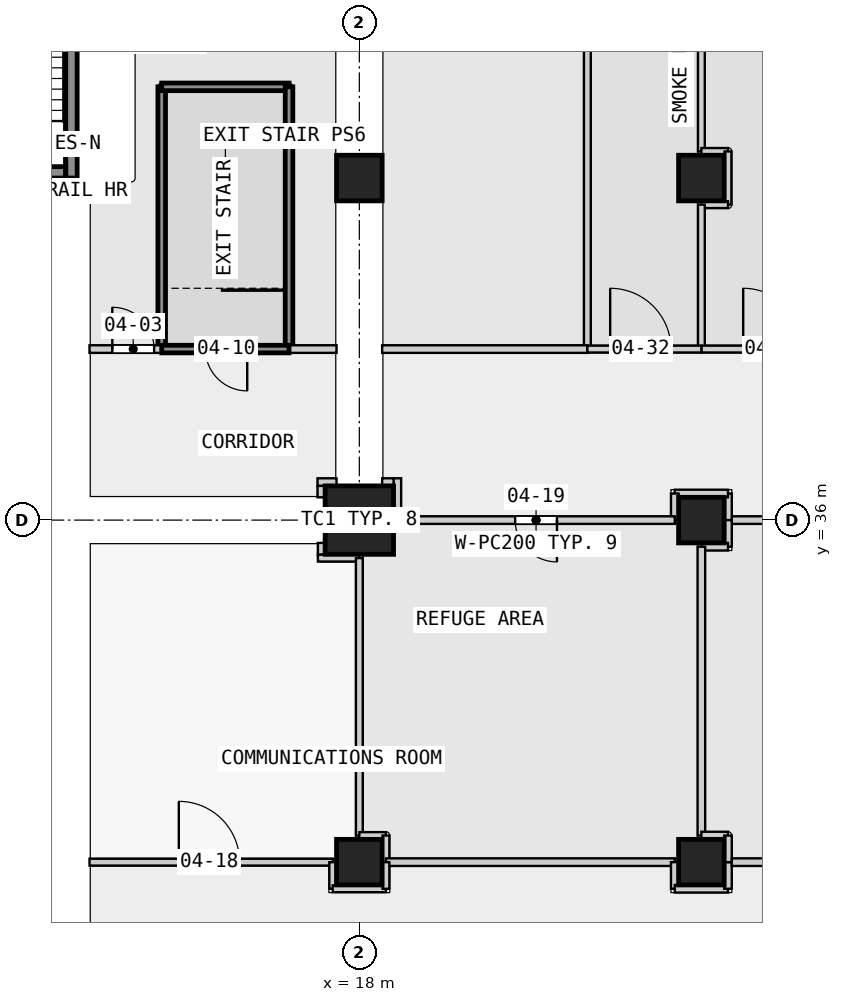
"""IFC4 building model, lengths in metres.
Left out: names, types, materials, properties, quantities, classifications, styles, units other than length and angle.
Written with IfcOpenShell. Run it as: python <this file> out.ifc"""

import sys

from ifc_helpers import new_model, si_unit, direction, frame, frame_2d, origin, origin_2d, place, context, subcontext, project, spatial, rectangle, extrude, element, fill, save


model = new_model("IFC4")
c1 = context("Model", 3, precision=1e-05, world=origin(), true_north=direction((0.0, 1.0)))
c2 = subcontext(c1, "Body", "Model", "MODEL_VIEW")
j1 = project(units=[si_unit("LENGTHUNIT", "METRE"), si_unit("PLANEANGLEUNIT", "RADIAN")], contexts=[c1])
p1 = place(None, origin())
s1 = spatial("IfcSite", under=j1, at=p1, CompositionType="ELEMENT")
p2 = place(p1, origin())
s2 = spatial("IfcBuilding", under=s1, at=p2, CompositionType="ELEMENT")
p3 = place(p2, frame((0.0, 0.0, 21.8)))
s3 = spatial("IfcBuildingStorey", under=s2, at=p3, CompositionType="ELEMENT", Elevation=21.8)
p4 = place(p3, frame((18.0, 27.0, 0.0), z_axis=(0.0, 0.0, 1.0), x_axis=(1.0, 0.0, 0.0)))
e1 = element("IfcColumn", 1, at=p4, inside=s3, PredefinedType="COLUMN", context=c2, shape_type="SweptSolid", body=[
    extrude(rectangle(XDim=1.2, YDim=1.2, at=origin_2d()), origin(), (0.0, 0.0, 1.0), 5.0),
])
p5 = place(p3, frame((18.0, 36.0, 0.0), z_axis=(0.0, 0.0, 1.0), x_axis=(1.0, 0.0, 0.0)))
e2 = element("IfcColumn", 2, at=p5, inside=s3, PredefinedType="COLUMN", context=c2, shape_type="SweptSolid", body=[
    extrude(rectangle(XDim=1.8, YDim=1.8, at=origin_2d()), origin(), (0.0, 0.0, 1.0), 5.0),
])
for number, where, z_axis, x_axis in (
    (3, (18.0, 45.0, 0.0), (0.0, 0.0, 1.0), (1.0, 0.0, 0.0)),
    (4, (27.0, 27.0, 0.0), (0.0, 0.0, 1.0), (1.0, 0.0, 0.0)),
    (5, (27.0, 36.0, 0.0), (0.0, 0.0, 1.0), (1.0, 0.0, 0.0)),
    (6, (27.0, 45.0, 0.0), (0.0, 0.0, 1.0), (1.0, 0.0, 0.0)),
):
    element("IfcColumn", number, at=place(p3, frame(where, z_axis=z_axis, x_axis=x_axis)), inside=s3, PredefinedType="COLUMN", context=c2, shape_type="SweptSolid", body=[
        extrude(rectangle(XDim=1.2, YDim=1.2, at=origin_2d()), origin(), (0.0, 0.0, 1.0), 5.0),
    ])
p6 = place(p3, frame((7.725, 45.15, 0.0), z_axis=(0.0, 0.0, 1.0), x_axis=(1.0, 0.0, 0.0)))
e7 = element("IfcWall", 7, at=p6, inside=s3, PredefinedType="SHEAR", context=c2, shape_type="SweptSolid", body=[
    extrude(rectangle(XDim=2.55, YDim=0.3, at=frame_2d((1.275, 0.0))), origin(), (0.0, 0.0, 1.0), 5.0),
])
p7 = place(p3, frame((10.425, 45.0, 0.0), z_axis=(0.0, 0.0, 1.0), x_axis=(0.0, 1.0, 0.0)))
e8 = element("IfcWall", 8, at=p7, inside=s3, PredefinedType="SHEAR", context=c2, shape_type="SweptSolid", body=[
    extrude(rectangle(XDim=7.2, YDim=0.3, at=frame_2d((3.6, 0.0))), origin(), (0.0, 0.0, 1.0), 5.0),
])
p8 = place(p3, frame((35.3, 36.0, 0.0), z_axis=(0.0, 0.0, 1.0), x_axis=(-1.0, 0.0, 0.0)))
e9 = element("IfcWall", 9, at=p8, inside=s3, PredefinedType="PARTITIONING", context=c2, shape_type="SweptSolid", body=[
    extrude(rectangle(XDim=7.6, YDim=0.2, at=frame_2d((3.8, 0.0))), origin(), (0.0, 0.0, 1.0), 4.5),
])
p9 = place(p3, frame((27.0, 53.3, 0.0), z_axis=(0.0, 0.0, 1.0), x_axis=(0.0, -1.0, 0.0)))
e10 = element("IfcWall", 10, at=p9, inside=s3, PredefinedType="PARTITIONING", context=c2, shape_type="SweptSolid", body=[
    extrude(rectangle(XDim=7.6, YDim=0.18, at=frame_2d((3.8, 0.0))), origin(), (0.0, 0.0, 1.0), 4.5),
])
p10 = place(p3, frame((27.0, 45.7, 0.0), z_axis=(0.0, 0.0, 1.0), x_axis=(1.0, 0.0, 0.0)))
e11 = element("IfcWall", 11, at=p10, inside=s3, PredefinedType="PARTITIONING", context=c2, shape_type="SweptSolid", body=[
    extrude(rectangle(XDim=0.7, YDim=0.18, at=frame_2d((0.35, 0.0))), origin(), (0.0, 0.0, 1.0), 4.5),
])
p11 = place(p3, frame((27.7, 45.7, 0.0), z_axis=(0.0, 0.0, 1.0), x_axis=(0.0, -1.0, 0.0)))
e12 = element("IfcWall", 12, at=p11, inside=s3, PredefinedType="PARTITIONING", context=c2, shape_type="SweptSolid", body=[
    extrude(rectangle(XDim=1.4, YDim=0.18, at=frame_2d((0.7, 0.0))), origin(), (0.0, 0.0, 1.0), 4.5),
])
p12 = place(p3, frame((27.7, 44.3, 0.0), z_axis=(0.0, 0.0, 1.0), x_axis=(-1.0, 0.0, 0.0)))
e13 = element("IfcWall", 13, at=p12, inside=s3, PredefinedType="PARTITIONING", context=c2, shape_type="SweptSolid", body=[
    extrude(rectangle(XDim=0.7, YDim=0.18, at=frame_2d((0.35, 0.0))), origin(), (0.0, 0.0, 1.0), 4.5),
])
p13 = place(p3, frame((27.0, 44.3, 0.0), z_axis=(0.0, 0.0, 1.0), x_axis=(0.0, -1.0, 0.0)))
e14 = element("IfcWall", 14, at=p13, inside=s3, PredefinedType="PARTITIONING", context=c2, shape_type="SweptSolid", body=[
    extrude(rectangle(XDim=3.8, YDim=0.18, at=frame_2d((1.9, 0.0))), origin(), (0.0, 0.0, 1.0), 4.5),
])
p14 = place(p3, frame((24.0, 59.85, 0.0), z_axis=(0.0, 0.0, 1.0), x_axis=(0.0, -1.0, 0.0)))
e15 = element("IfcWall", 15, at=p14, inside=s3, PredefinedType="PARTITIONING", context=c2, shape_type="SweptSolid", body=[
    extrude(rectangle(XDim=19.35, YDim=0.18, at=frame_2d((9.675, 0.0))), origin(), (0.0, 0.0, 1.0), 4.5),
])
p15 = place(p3, frame((12.8, 40.5, 0.0), z_axis=(0.0, 0.0, 1.0), x_axis=(0.0, 1.0, 0.0)))
e16 = element("IfcWall", 16, at=p15, inside=s3, PredefinedType="PARTITIONING", context=c2, shape_type="SweptSolid", body=[
    extrude(rectangle(XDim=6.9, YDim=0.2, at=frame_2d((3.45, 0.0))), origin(), (0.0, 0.0, 1.0), 4.5),
])
p16 = place(p3, frame((12.8, 47.4, 0.0), z_axis=(0.0, 0.0, 1.0), x_axis=(1.0, 0.0, 0.0)))
e17 = element("IfcWall", 17, at=p16, inside=s3, PredefinedType="PARTITIONING", context=c2, shape_type="SweptSolid", body=[
    extrude(rectangle(XDim=3.35, YDim=0.2, at=frame_2d((1.675, 0.0))), origin(), (0.0, 0.0, 1.0), 4.5),
])
p17 = place(p3, frame((16.15, 47.4, 0.0), z_axis=(0.0, 0.0, 1.0), x_axis=(0.0, -1.0, 0.0)))
e18 = element("IfcWall", 18, at=p17, inside=s3, PredefinedType="PARTITIONING", context=c2, shape_type="SweptSolid", body=[
    extrude(rectangle(XDim=6.9, YDim=0.2, at=frame_2d((3.45, 0.0))), origin(), (0.0, 0.0, 1.0), 4.5),
])
p18 = place(p3, frame((27.7, 36.0, 0.0), z_axis=(0.0, 0.0, 1.0), x_axis=(0.0, 1.0, 0.0)))
e19 = element("IfcWall", 19, at=p18, inside=s3, PredefinedType="PARTITIONING", context=c2, shape_type="SweptSolid", body=[
    extrude(rectangle(XDim=0.7, YDim=0.2, at=frame_2d((0.35, 0.0))), origin(), (0.0, 0.0, 1.0), 4.5),
])
p19 = place(p3, frame((27.7, 36.7, 0.0), z_axis=(0.0, 0.0, 1.0), x_axis=(-1.0, 0.0, 0.0)))
e20 = element("IfcWall", 20, at=p19, inside=s3, PredefinedType="PARTITIONING", context=c2, shape_type="SweptSolid", body=[
    extrude(rectangle(XDim=1.4, YDim=0.2, at=frame_2d((0.7, 0.0))), origin(), (0.0, 0.0, 1.0), 4.5),
])
p20 = place(p3, frame((26.3, 36.7, 0.0), z_axis=(0.0, 0.0, 1.0), x_axis=(0.0, -1.0, 0.0)))
e21 = element("IfcWall", 21, at=p20, inside=s3, PredefinedType="PARTITIONING", context=c2, shape_type="SweptSolid", body=[
    extrude(rectangle(XDim=0.7, YDim=0.2, at=frame_2d((0.35, 0.0))), origin(), (0.0, 0.0, 1.0), 4.5),
])
p21 = place(p3, frame((26.3, 36.0, 0.0), z_axis=(0.0, 0.0, 1.0), x_axis=(-1.0, 0.0, 0.0)))
e22 = element("IfcWall", 22, at=p21, inside=s3, PredefinedType="PARTITIONING", context=c2, shape_type="SweptSolid", body=[
    extrude(rectangle(XDim=7.3, YDim=0.2, at=frame_2d((3.65, 0.0))), origin(), (0.0, 0.0, 1.0), 4.5),
])
p22 = place(p21, frame((3.1, 0.0, 0.0)))
e23 = element("IfcOpeningElement", 23, at=p22, cuts=e22, PredefinedType="OPENING", context=c2, shape_type="SweptSolid", body=[
    extrude(rectangle(XDim=1.1, YDim=2.1, at=frame_2d((0.55, 1.05))), frame((0.0, 0.11, 0.0), z_axis=(0.0, -1.0, 0.0), x_axis=(1.0, 0.0, 0.0)), (0.0, 0.0, 1.0), 0.22),
])
p23 = place(p3, frame((19.0, 36.0, 0.0), z_axis=(0.0, 0.0, 1.0), x_axis=(0.0, 1.0, 0.0)))
e24 = element("IfcWall", 24, at=p23, inside=s3, PredefinedType="PARTITIONING", context=c2, shape_type="SweptSolid", body=[
    extrude(rectangle(XDim=1.1, YDim=0.2, at=frame_2d((0.55, 0.0))), origin(), (0.0, 0.0, 1.0), 4.5),
])
p24 = place(p3, frame((18.9, 37.0, 0.0), z_axis=(0.0, 0.0, 1.0), x_axis=(-1.0, 0.0, 0.0)))
e25 = element("IfcWall", 25, at=p24, inside=s3, PredefinedType="PARTITIONING", context=c2, shape_type="SweptSolid", body=[
    extrude(rectangle(XDim=0.3, YDim=0.2, at=frame_2d((0.15, 0.0))), origin(), (0.0, 0.0, 1.0), 4.5),
])
p25 = place(p3, frame((17.4, 37.0, 0.0), z_axis=(0.0, 0.0, 1.0), x_axis=(-1.0, 0.0, 0.0)))
e26 = element("IfcWall", 26, at=p25, inside=s3, PredefinedType="PARTITIONING", context=c2, shape_type="SweptSolid", body=[
    extrude(rectangle(XDim=0.5, YDim=0.2, at=frame_2d((0.25, 0.0))), origin(), (0.0, 0.0, 1.0), 4.5),
])
p26 = place(p3, frame((17.0, 36.9, 0.0), z_axis=(0.0, 0.0, 1.0), x_axis=(0.0, -1.0, 0.0)))
e27 = element("IfcWall", 27, at=p26, inside=s3, PredefinedType="PARTITIONING", context=c2, shape_type="SweptSolid", body=[
    extrude(rectangle(XDim=0.3, YDim=0.2, at=frame_2d((0.15, 0.0))), origin(), (0.0, 0.0, 1.0), 4.5),
])
p27 = place(p3, frame((10.9, 40.5, 0.0), z_axis=(0.0, 0.0, 1.0), x_axis=(1.0, 0.0, 0.0)))
e28 = element("IfcWall", 28, at=p27, inside=s3, PredefinedType="PARTITIONING", context=c2, shape_type="SweptSolid", body=[
    extrude(rectangle(XDim=1.9, YDim=0.2, at=frame_2d((0.95, 0.0))), origin(), (0.0, 0.0, 1.0), 4.5),
])
p28 = place(p27, frame((0.6, 0.0, 0.0)))
e29 = element("IfcOpeningElement", 29, at=p28, cuts=e28, PredefinedType="OPENING", context=c2, shape_type="SweptSolid", body=[
    extrude(rectangle(XDim=1.1, YDim=2.1, at=frame_2d((0.55, 1.05))), frame((0.0, 0.11, 0.0), z_axis=(0.0, -1.0, 0.0), x_axis=(1.0, 0.0, 0.0)), (0.0, 0.0, 1.0), 0.22),
])
p29 = place(p3, frame((17.0, 35.4, 0.0), z_axis=(0.0, 0.0, 1.0), x_axis=(0.0, -1.0, 0.0)))
e30 = element("IfcWall", 30, at=p29, inside=s3, PredefinedType="PARTITIONING", context=c2, shape_type="SweptSolid", body=[
    extrude(rectangle(XDim=0.31, YDim=0.18, at=frame_2d((0.155, 0.0))), origin(), (0.0, 0.0, 1.0), 4.5),
])
p30 = place(p3, frame((16.91, 35.0, 0.0), z_axis=(0.0, 0.0, 1.0), x_axis=(1.0, 0.0, 0.0)))
e31 = element("IfcWall", 31, at=p30, inside=s3, PredefinedType="PARTITIONING", context=c2, shape_type="SweptSolid", body=[
    extrude(rectangle(XDim=1.09, YDim=0.18, at=frame_2d((0.545, 0.0))), origin(), (0.0, 0.0, 1.0), 4.5),
])
p31 = place(p3, frame((18.0, 35.0, 0.0), z_axis=(0.0, 0.0, 1.0), x_axis=(0.0, -1.0, 0.0)))
e32 = element("IfcWall", 32, at=p31, inside=s3, PredefinedType="PARTITIONING", context=c2, shape_type="SweptSolid", body=[
    extrude(rectangle(XDim=7.3, YDim=0.18, at=frame_2d((3.65, 0.0))), origin(), (0.0, 0.0, 1.0), 4.5),
])
for number, where, z_axis, x_axis in (
    (33, (18.0, 27.7, 0.0), (0.0, 0.0, 1.0), (1.0, 0.0, 0.0)),
    (34, (18.7, 27.7, 0.0), (0.0, 0.0, 1.0), (0.0, -1.0, 0.0)),
):
    element("IfcWall", number, at=place(p3, frame(where, z_axis=z_axis, x_axis=x_axis)), inside=s3, PredefinedType="PARTITIONING", context=c2, shape_type="SweptSolid", body=[
        extrude(rectangle(XDim=0.7, YDim=0.18, at=frame_2d((0.35, 0.0))), origin(), (0.0, 0.0, 1.0), 4.5),
    ])
p32 = place(p3, frame((18.7, 27.0, 0.0), z_axis=(0.0, 0.0, 1.0), x_axis=(1.0, 0.0, 0.0)))
e35 = element("IfcWall", 35, at=p32, inside=s3, PredefinedType="PARTITIONING", context=c2, shape_type="SweptSolid", body=[
    extrude(rectangle(XDim=7.6, YDim=0.2, at=frame_2d((3.8, 0.0))), origin(), (0.0, 0.0, 1.0), 4.5),
])
p33 = place(p3, frame((26.3, 27.0, 0.0), z_axis=(0.0, 0.0, 1.0), x_axis=(0.0, -1.0, 0.0)))
e36 = element("IfcWall", 36, at=p33, inside=s3, PredefinedType="PARTITIONING", context=c2, shape_type="SweptSolid", body=[
    extrude(rectangle(XDim=0.7, YDim=0.2, at=frame_2d((0.35, 0.0))), origin(), (0.0, 0.0, 1.0), 4.5),
])
p34 = place(p3, frame((26.3, 26.3, 0.0), z_axis=(0.0, 0.0, 1.0), x_axis=(1.0, 0.0, 0.0)))
e37 = element("IfcWall", 37, at=p34, inside=s3, PredefinedType="PARTITIONING", context=c2, shape_type="SweptSolid", body=[
    extrude(rectangle(XDim=1.4, YDim=0.2, at=frame_2d((0.7, 0.0))), origin(), (0.0, 0.0, 1.0), 4.5),
])
p35 = place(p3, frame((27.7, 26.3, 0.0), z_axis=(0.0, 0.0, 1.0), x_axis=(0.0, 1.0, 0.0)))
e38 = element("IfcWall", 38, at=p35, inside=s3, PredefinedType="PARTITIONING", context=c2, shape_type="SweptSolid", body=[
    extrude(rectangle(XDim=0.7, YDim=0.2, at=frame_2d((0.35, 0.0))), origin(), (0.0, 0.0, 1.0), 4.5),
])
p36 = place(p3, frame((10.9, 27.0, 0.0), z_axis=(0.0, 0.0, 1.0), x_axis=(1.0, 0.0, 0.0)))
e39 = element("IfcWall", 39, at=p36, inside=s3, PredefinedType="PARTITIONING", context=c2, shape_type="SweptSolid", body=[
    extrude(rectangle(XDim=6.4, YDim=0.18, at=frame_2d((3.2, 0.0))), origin(), (0.0, 0.0, 1.0), 4.5),
])
p37 = place(p36, frame((2.35, 0.0, 0.0)))
e40 = element("IfcOpeningElement", 40, at=p37, cuts=e39, PredefinedType="OPENING", context=c2, shape_type="SweptSolid", body=[
    extrude(rectangle(XDim=1.6, YDim=2.4, at=frame_2d((0.8, 1.2))), frame((0.0, 0.1, 0.0), z_axis=(0.0, -1.0, 0.0), x_axis=(1.0, 0.0, 0.0)), (0.0, 0.0, 1.0), 0.2),
])
p38 = place(p3, frame((17.3, 27.0, 0.0), z_axis=(0.0, 0.0, 1.0), x_axis=(0.0, -1.0, 0.0)))
e41 = element("IfcWall", 41, at=p38, inside=s3, PredefinedType="PARTITIONING", context=c2, shape_type="SweptSolid", body=[
    extrude(rectangle(XDim=0.7, YDim=0.18, at=frame_2d((0.35, 0.0))), origin(), (0.0, 0.0, 1.0), 4.5),
])
p39 = place(p3, frame((17.3, 26.3, 0.0), z_axis=(0.0, 0.0, 1.0), x_axis=(1.0, 0.0, 0.0)))
e42 = element("IfcWall", 42, at=p39, inside=s3, PredefinedType="PARTITIONING", context=c2, shape_type="SweptSolid", body=[
    extrude(rectangle(XDim=1.4, YDim=0.18, at=frame_2d((0.7, 0.0))), origin(), (0.0, 0.0, 1.0), 4.5),
])
p40 = place(p3, frame((18.7, 26.3, 0.0), z_axis=(0.0, 0.0, 1.0), x_axis=(0.0, 1.0, 0.0)))
e43 = element("IfcWall", 43, at=p40, inside=s3, PredefinedType="PARTITIONING", context=c2, shape_type="SweptSolid", body=[
    extrude(rectangle(XDim=0.7, YDim=0.18, at=frame_2d((0.35, 0.0))), origin(), (0.0, 0.0, 1.0), 4.5),
])
for number, where, z_axis, x_axis in (
    (44, (27.7, 36.0, 0.0), (0.0, 0.0, 1.0), (0.0, -1.0, 0.0)),
    (45, (27.7, 35.3, 0.0), (0.0, 0.0, 1.0), (-1.0, 0.0, 0.0)),
):
    element("IfcWall", number, at=place(p3, frame(where, z_axis=z_axis, x_axis=x_axis)), inside=s3, PredefinedType="PARTITIONING", context=c2, shape_type="SweptSolid", body=[
        extrude(rectangle(XDim=0.7, YDim=0.2, at=frame_2d((0.35, 0.0))), origin(), (0.0, 0.0, 1.0), 4.5),
    ])
p41 = place(p3, frame((27.0, 35.3, 0.0), z_axis=(0.0, 0.0, 1.0), x_axis=(0.0, -1.0, 0.0)))
e46 = element("IfcWall", 46, at=p41, inside=s3, PredefinedType="PARTITIONING", context=c2, shape_type="SweptSolid", body=[
    extrude(rectangle(XDim=7.6, YDim=0.2, at=frame_2d((3.8, 0.0))), origin(), (0.0, 0.0, 1.0), 4.5),
])
for number, where, z_axis, x_axis in (
    (47, (27.0, 27.7, 0.0), (0.0, 0.0, 1.0), (1.0, 0.0, 0.0)),
    (48, (27.7, 27.7, 0.0), (0.0, 0.0, 1.0), (0.0, -1.0, 0.0)),
):
    element("IfcWall", number, at=place(p3, frame(where, z_axis=z_axis, x_axis=x_axis)), inside=s3, PredefinedType="PARTITIONING", context=c2, shape_type="SweptSolid", body=[
        extrude(rectangle(XDim=0.7, YDim=0.2, at=frame_2d((0.35, 0.0))), origin(), (0.0, 0.0, 1.0), 4.5),
    ])
p42 = place(p3, frame((18.6, 40.5, 0.0), z_axis=(0.0, 0.0, 1.0), x_axis=(1.0, 0.0, 0.0)))
e49 = element("IfcWall", 49, at=p42, inside=s3, PredefinedType="PARTITIONING", context=c2, shape_type="SweptSolid", body=[
    extrude(rectangle(XDim=5.4, YDim=0.2, at=frame_2d((2.7, 0.0))), origin(), (0.0, 0.0, 1.0), 4.5),
])
p43 = place(p3, frame((16.15, 40.5, 0.0), z_axis=(0.0, 0.0, 1.0), x_axis=(1.0, 0.0, 0.0)))
e50 = element("IfcWall", 50, at=p43, inside=s3, PredefinedType="PARTITIONING", context=c2, shape_type="SweptSolid", body=[
    extrude(rectangle(XDim=1.25, YDim=0.2, at=frame_2d((0.625, 0.0))), origin(), (0.0, 0.0, 1.0), 4.5),
])
p44 = place(p3, frame((27.0, 40.5, 0.0), z_axis=(0.0, 0.0, 1.0), x_axis=(1.0, 0.0, 0.0)))
e51 = element("IfcWall", 51, at=p44, inside=s3, PredefinedType="PARTITIONING", context=c2, shape_type="SweptSolid", body=[
    extrude(rectangle(XDim=3.6, YDim=0.18, at=frame_2d((1.8, 0.0))), origin(), (0.0, 0.0, 1.0), 4.5),
])
p45 = place(p44, frame((1.1, 0.0, 0.0)))
e52 = element("IfcOpeningElement", 52, at=p45, cuts=e51, PredefinedType="OPENING", context=c2, shape_type="SweptSolid", body=[
    extrude(rectangle(XDim=1.6, YDim=2.4, at=frame_2d((0.8, 1.2))), frame((0.0, 0.1, 0.0), z_axis=(0.0, -1.0, 0.0), x_axis=(1.0, 0.0, 0.0)), (0.0, 0.0, 1.0), 0.2),
])
p46 = place(p3, frame((16.15, 40.5, 0.0), z_axis=(0.0, 0.0, 1.0), x_axis=(-1.0, 0.0, 0.0)))
e53 = element("IfcWall", 53, at=p46, inside=s3, PredefinedType="PARTITIONING", context=c2, shape_type="SweptSolid", body=[
    extrude(rectangle(XDim=3.35, YDim=0.2, at=frame_2d((1.675, 0.0))), origin(), (0.0, 0.0, 1.0), 4.5),
])
p47 = place(p46, frame((1.1, 0.0, 0.0)))
e54 = element("IfcOpeningElement", 54, at=p47, cuts=e53, PredefinedType="OPENING", context=c2, shape_type="SweptSolid", body=[
    extrude(rectangle(XDim=1.1, YDim=2.1, at=frame_2d((0.55, 1.05))), frame((0.0, 0.11, 0.0), z_axis=(0.0, -1.0, 0.0), x_axis=(1.0, 0.0, 0.0)), (0.0, 0.0, 1.0), 0.22),
])
p48 = place(p3, frame((24.0, 40.5, 0.0), z_axis=(0.0, 0.0, 1.0), x_axis=(1.0, 0.0, 0.0)))
e55 = element("IfcWall", 55, at=p48, inside=s3, PredefinedType="PARTITIONING", context=c2, shape_type="SweptSolid", body=[
    extrude(rectangle(XDim=3.0, YDim=0.18, at=frame_2d((1.5, 0.0))), origin(), (0.0, 0.0, 1.0), 4.5),
])
p49 = place(p48, frame((0.6, 0.0, 0.0)))
e56 = element("IfcOpeningElement", 56, at=p49, cuts=e55, PredefinedType="OPENING", context=c2, shape_type="SweptSolid", body=[
    extrude(rectangle(XDim=1.6, YDim=2.4, at=frame_2d((0.8, 1.2))), frame((0.0, 0.1, 0.0), z_axis=(0.0, -1.0, 0.0), x_axis=(1.0, 0.0, 0.0)), (0.0, 0.0, 1.0), 0.2),
])
p50 = place(p3, frame((27.8, 27.0, 0.0), z_axis=(0.0, 0.0, 1.0), x_axis=(1.0, 0.0, 0.0)))
e57 = element("IfcWall", 57, at=p50, inside=s3, PredefinedType="PARTITIONING", context=c2, shape_type="SweptSolid", body=[
    extrude(rectangle(XDim=2.8, YDim=0.2, at=frame_2d((1.4, 0.0))), origin(), (0.0, 0.0, 1.0), 4.5),
])
p51 = place(p28, origin())
e58 = element("IfcDoor", 58, at=p51, inside=s3, OperationType="SINGLE_SWING_LEFT", PredefinedType="DOOR", context=c2, shape_type="SweptSolid", body=[
    extrude(rectangle(XDim=1.1, YDim=2.1, at=frame_2d((0.55, 1.05))), frame((0.0, 0.025, 0.0), z_axis=(0.0, -1.0, 0.0), x_axis=(1.0, 0.0, 0.0)), (0.0, 0.0, 1.0), 0.05),
])
fill(e29, e58)
p52 = place(p47, origin())
e59 = element("IfcDoor", 59, at=p52, inside=s3, OperationType="SINGLE_SWING_LEFT", PredefinedType="DOOR", context=c2, shape_type="SweptSolid", body=[
    extrude(rectangle(XDim=1.1, YDim=2.1, at=frame_2d((0.55, 1.05))), frame((0.0, 0.025, 0.0), z_axis=(0.0, -1.0, 0.0), x_axis=(1.0, 0.0, 0.0)), (0.0, 0.0, 1.0), 0.05),
])
fill(e54, e59)
p53 = place(p37, origin())
e60 = element("IfcDoor", 60, at=p53, inside=s3, OperationType="SINGLE_SWING_LEFT", PredefinedType="DOOR", context=c2, shape_type="SweptSolid", body=[
    extrude(rectangle(XDim=1.6, YDim=2.4, at=frame_2d((0.8, 1.2))), frame((0.0, 0.025, 0.0), z_axis=(0.0, -1.0, 0.0), x_axis=(1.0, 0.0, 0.0)), (0.0, 0.0, 1.0), 0.05),
])
fill(e40, e60)
p54 = place(p22, origin())
e61 = element("IfcDoor", 61, at=p54, inside=s3, OperationType="SINGLE_SWING_LEFT", PredefinedType="DOOR", context=c2, shape_type="SweptSolid", body=[
    extrude(rectangle(XDim=1.1, YDim=2.1, at=frame_2d((0.55, 1.05))), frame((0.0, 0.025, 0.0), z_axis=(0.0, -1.0, 0.0), x_axis=(1.0, 0.0, 0.0)), (0.0, 0.0, 1.0), 0.05),
])
fill(e23, e61)
p55 = place(p49, origin())
e62 = element("IfcDoor", 62, at=p55, inside=s3, OperationType="SINGLE_SWING_LEFT", PredefinedType="DOOR", context=c2, shape_type="SweptSolid", body=[
    extrude(rectangle(XDim=1.6, YDim=2.4, at=frame_2d((0.8, 1.2))), frame((0.0, 0.025, 0.0), z_axis=(0.0, -1.0, 0.0), x_axis=(1.0, 0.0, 0.0)), (0.0, 0.0, 1.0), 0.05),
])
fill(e56, e62)
p56 = place(p45, origin())
e63 = element("IfcDoor", 63, at=p56, inside=s3, OperationType="SINGLE_SWING_LEFT", PredefinedType="DOOR", context=c2, shape_type="SweptSolid", body=[
    extrude(rectangle(XDim=1.6, YDim=2.4, at=frame_2d((0.8, 1.2))), frame((0.0, 0.025, 0.0), z_axis=(0.0, -1.0, 0.0), x_axis=(1.0, 0.0, 0.0)), (0.0, 0.0, 1.0), 0.05),
])
fill(e52, e63)
save(model, sys.argv[1])
